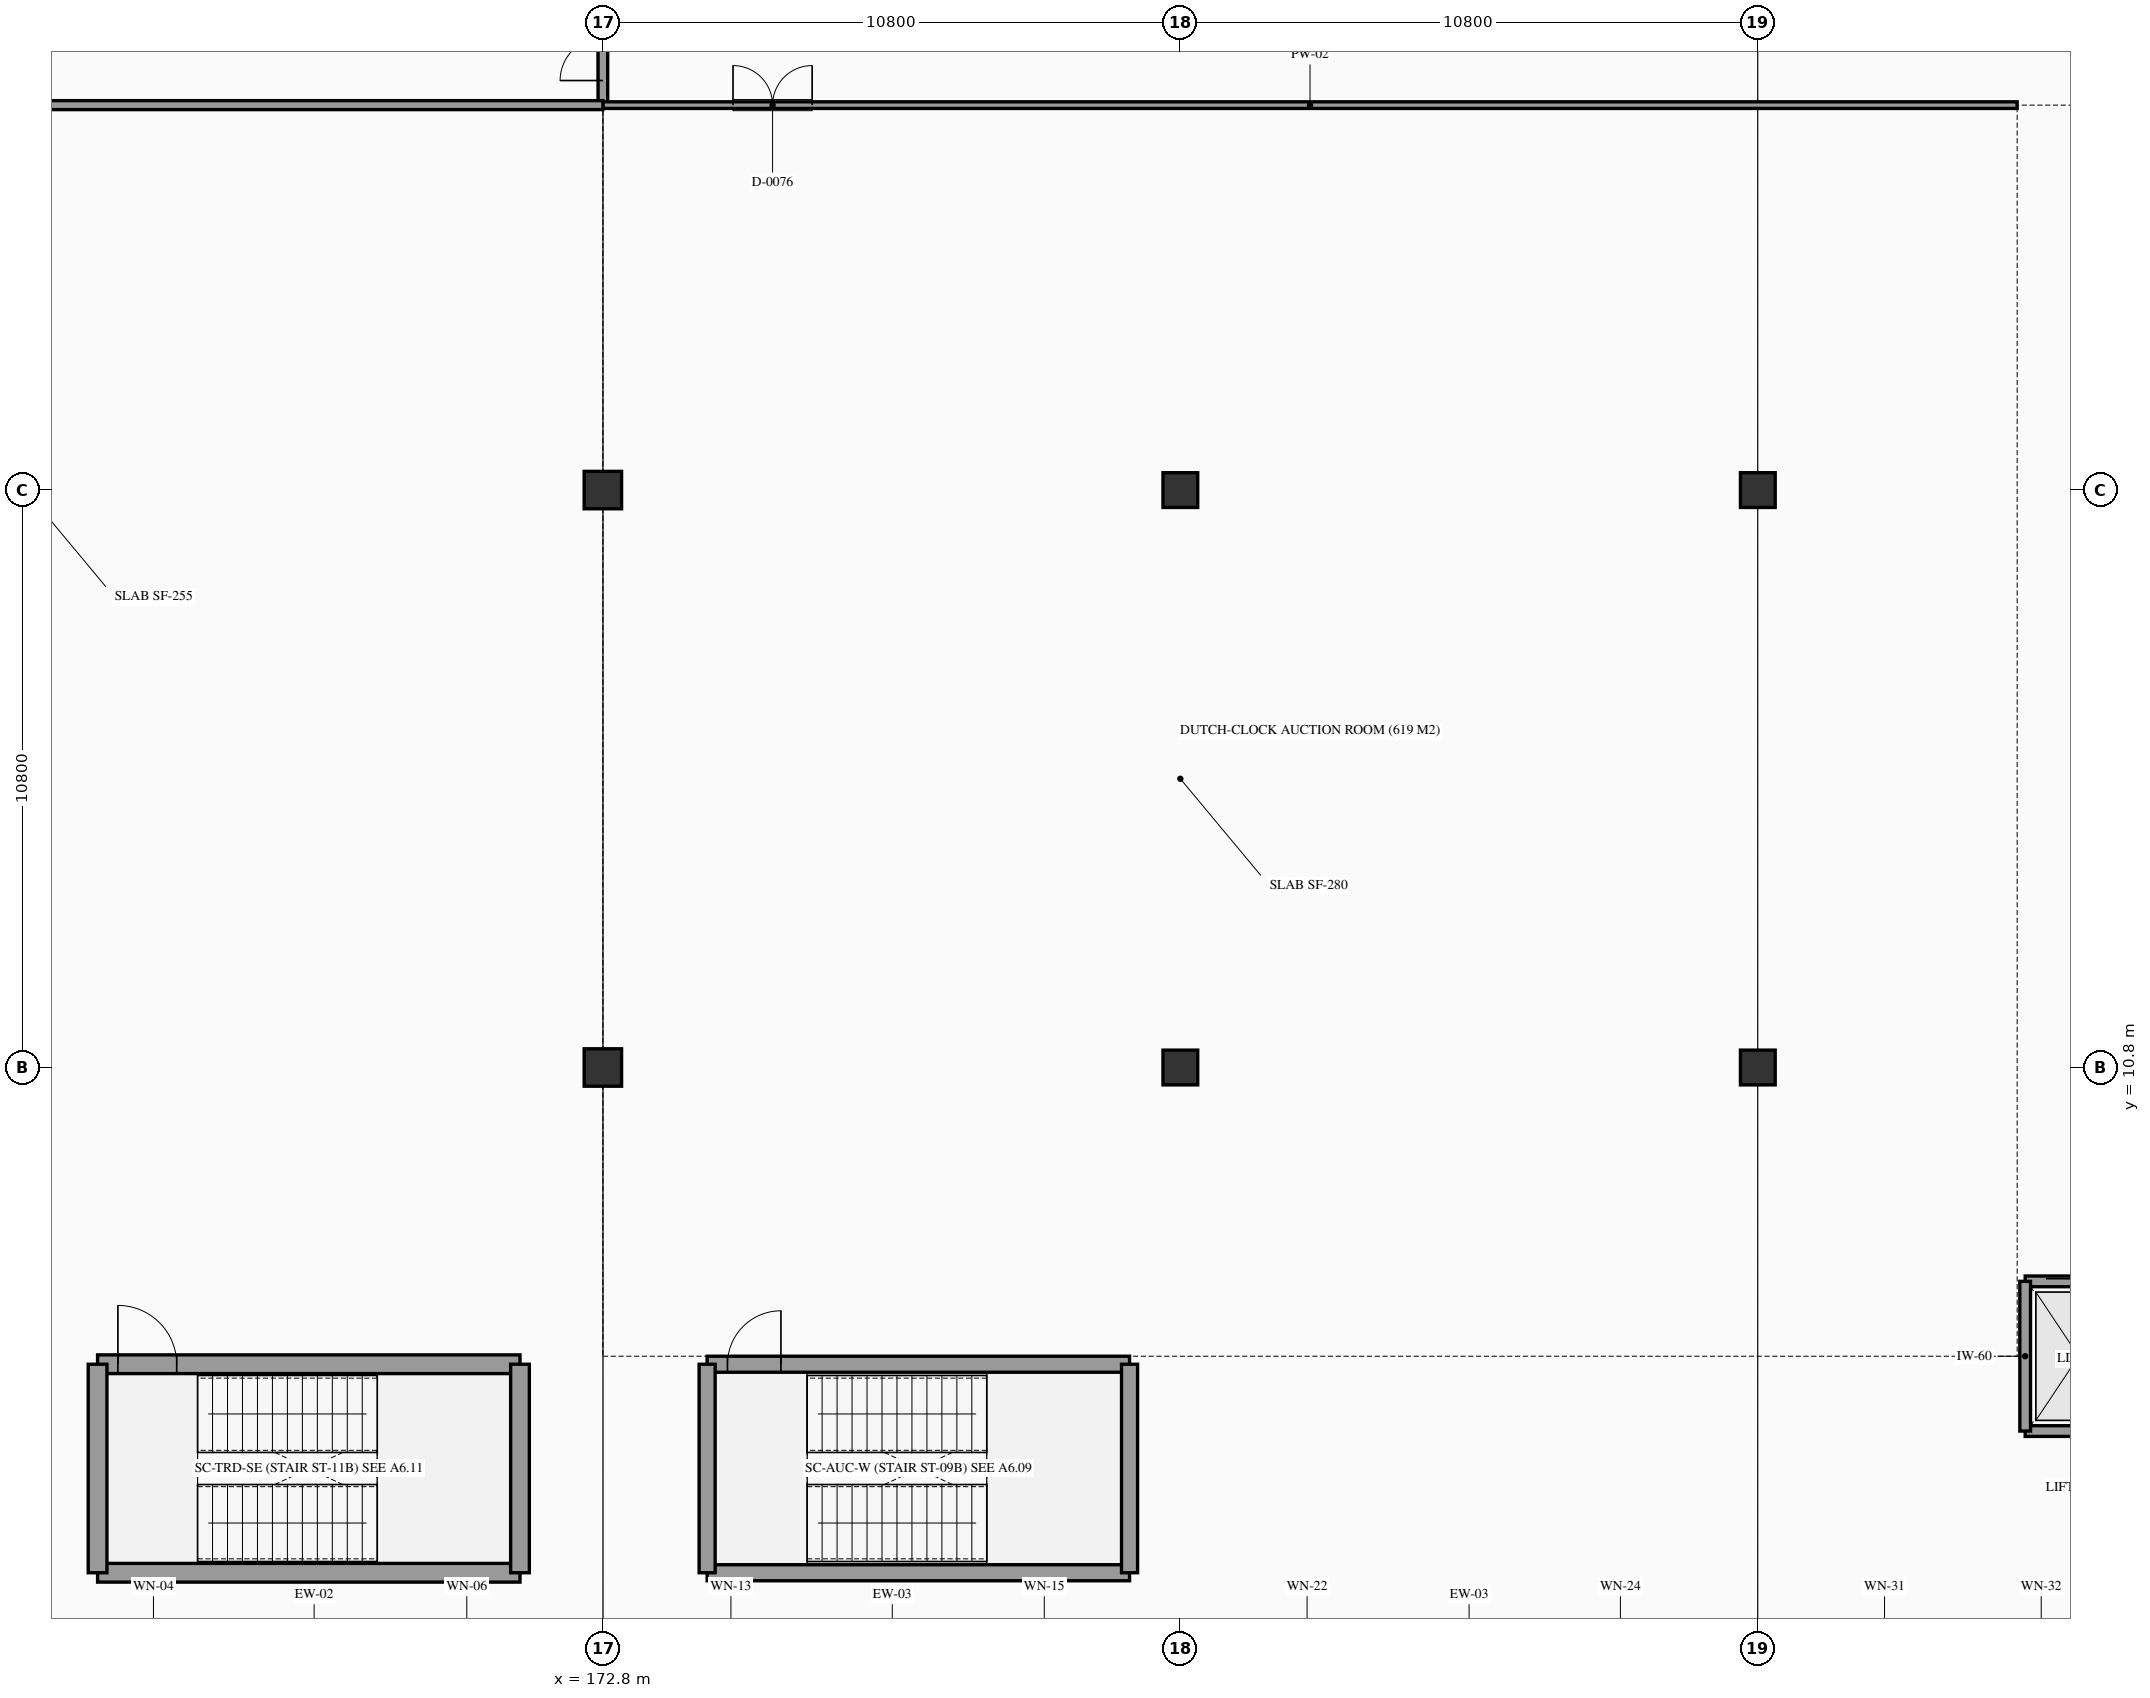
"""IFC4 building model, lengths in metres.
Left out: names, types, materials, properties, quantities, classifications, styles, units other than length and angle.
Written with IfcOpenShell. Run it as: python <this file> out.ifc"""

import sys

from ifc_helpers import new_model, si_unit, direction, frame, frame_2d, origin, origin_2d, place, context, subcontext, project, spatial, rectangle, extrude, element, fill, save


model = new_model("IFC4")
c1 = context("Model", 3, precision=1e-05, world=origin(), true_north=direction((0.0, 1.0)))
c2 = subcontext(c1, "Body", "Model", "MODEL_VIEW")
j1 = project(units=[si_unit("LENGTHUNIT", "METRE"), si_unit("PLANEANGLEUNIT", "RADIAN")], contexts=[c1])
p1 = place(None, origin())
s1 = spatial("IfcSite", under=j1, at=p1, CompositionType="ELEMENT")
p2 = place(p1, origin())
s2 = spatial("IfcBuilding", under=s1, at=p2, CompositionType="ELEMENT")
p3 = place(p2, frame((0.0, 0.0, 5.4)))
s3 = spatial("IfcBuildingStorey", under=s2, at=p3, CompositionType="ELEMENT", Elevation=5.4)
for number, where, z_axis, x_axis in (
    (1, (172.8, 10.8, 0.0), (0.0, 0.0, 1.0), (1.0, 0.0, 0.0)),
    (2, (172.8, 21.6, 0.0), (0.0, 0.0, 1.0), (1.0, 0.0, 0.0)),
):
    element("IfcColumn", number, at=place(p3, frame(where, z_axis=z_axis, x_axis=x_axis)), inside=s3, PredefinedType="COLUMN", context=c2, shape_type="SweptSolid", body=[
        extrude(rectangle(XDim=0.7, YDim=0.7, at=origin_2d()), origin(), (0.0, 0.0, 1.0), 4.68),
    ])
for number, where, z_axis, x_axis in (
    (3, (183.6, 10.8, 0.0), (0.0, 0.0, 1.0), (1.0, 0.0, 0.0)),
    (4, (183.6, 21.6, 0.0), (0.0, 0.0, 1.0), (1.0, 0.0, 0.0)),
    (5, (194.4, 10.8, 0.0), (0.0, 0.0, 1.0), (1.0, 0.0, 0.0)),
    (6, (194.4, 21.6, 0.0), (0.0, 0.0, 1.0), (1.0, 0.0, 0.0)),
):
    element("IfcColumn", number, at=place(p3, frame(where, z_axis=z_axis, x_axis=x_axis)), inside=s3, PredefinedType="COLUMN", context=c2, shape_type="SweptSolid", body=[
        extrude(rectangle(XDim=0.65, YDim=0.65, at=origin_2d()), origin(), (0.0, 0.0, 1.0), 4.68),
    ])
p4 = place(p3, frame((174.75, 1.35, 0.0), z_axis=(0.0, 0.0, 1.0), x_axis=(1.0, 0.0, 0.0)))
e7 = element("IfcWall", 7, at=p4, inside=s3, PredefinedType="SHEAR", context=c2, shape_type="SweptSolid", body=[
    extrude(rectangle(XDim=7.9, YDim=0.3, at=frame_2d((3.95, 0.0))), origin(), (0.0, 0.0, 1.0), 4.68),
])
p5 = place(p3, frame((174.75, 5.25, 0.0), z_axis=(0.0, 0.0, 1.0), x_axis=(1.0, 0.0, 0.0)))
e8 = element("IfcWall", 8, at=p5, inside=s3, PredefinedType="SHEAR", context=c2, shape_type="SweptSolid", body=[
    extrude(rectangle(XDim=7.9, YDim=0.3, at=frame_2d((3.95, 0.0))), origin(), (0.0, 0.0, 1.0), 4.68),
])
p6 = place(p5, frame((0.38, 0.0, 0.0)))
e9 = element("IfcOpeningElement", 9, at=p6, cuts=e8, PredefinedType="OPENING", context=c2, shape_type="SweptSolid", body=[
    extrude(rectangle(XDim=1.0, YDim=2.15, at=frame_2d((0.5, 1.075))), frame((0.0, 0.16, 0.0), z_axis=(0.0, -1.0, 0.0), x_axis=(1.0, 0.0, 0.0)), (0.0, 0.0, 1.0), 0.32),
])
for number, where, z_axis, x_axis in (
    (10, (174.75, 1.35, 0.0), (0.0, 0.0, 1.0), (0.0, 1.0, 0.0)),
    (11, (182.65, 1.35, 0.0), (0.0, 0.0, 1.0), (0.0, 1.0, 0.0)),
):
    element("IfcWall", number, at=place(p3, frame(where, z_axis=z_axis, x_axis=x_axis)), inside=s3, PredefinedType="SHEAR", context=c2, shape_type="SweptSolid", body=[
        extrude(rectangle(XDim=3.9, YDim=0.3, at=frame_2d((1.95, 0.0))), origin(), (0.0, 0.0, 1.0), 4.68),
    ])
p7 = place(p3, frame((163.35, 1.35, 0.0), z_axis=(0.0, 0.0, 1.0), x_axis=(1.0, 0.0, 0.0)))
e12 = element("IfcWall", 12, at=p7, inside=s3, PredefinedType="SHEAR", context=c2, shape_type="SweptSolid", body=[
    extrude(rectangle(XDim=7.9, YDim=0.35, at=frame_2d((3.95, 0.0))), origin(), (0.0, 0.0, 1.0), 4.68),
])
p8 = place(p3, frame((163.35, 5.25, 0.0), z_axis=(0.0, 0.0, 1.0), x_axis=(1.0, 0.0, 0.0)))
e13 = element("IfcWall", 13, at=p8, inside=s3, PredefinedType="SHEAR", context=c2, shape_type="SweptSolid", body=[
    extrude(rectangle(XDim=7.9, YDim=0.35, at=frame_2d((3.95, 0.0))), origin(), (0.0, 0.0, 1.0), 4.68),
])
p9 = place(p8, frame((0.38, 0.0, 0.0)))
e14 = element("IfcOpeningElement", 14, at=p9, cuts=e13, PredefinedType="OPENING", context=c2, shape_type="SweptSolid", body=[
    extrude(rectangle(XDim=1.1, YDim=2.2, at=frame_2d((0.55, 1.1))), frame((0.0, 0.185, 0.0), z_axis=(0.0, -1.0, 0.0), x_axis=(1.0, 0.0, 0.0)), (0.0, 0.0, 1.0), 0.37),
])
for number, where, z_axis, x_axis in (
    (15, (163.35, 1.35, 0.0), (0.0, 0.0, 1.0), (0.0, 1.0, 0.0)),
    (16, (171.25, 1.35, 0.0), (0.0, 0.0, 1.0), (0.0, 1.0, 0.0)),
):
    element("IfcWall", number, at=place(p3, frame(where, z_axis=z_axis, x_axis=x_axis)), inside=s3, PredefinedType="SHEAR", context=c2, shape_type="SweptSolid", body=[
        extrude(rectangle(XDim=3.9, YDim=0.35, at=frame_2d((1.95, 0.0))), origin(), (0.0, 0.0, 1.0), 4.68),
    ])
p10 = place(p3, frame((199.4, 4.0, 0.0), z_axis=(0.0, 0.0, 1.0), x_axis=(1.0, 0.0, 0.0)))
e17 = element("IfcWall", 17, at=p10, inside=s3, PredefinedType="SOLIDWALL", context=c2, shape_type="SweptSolid", body=[
    extrude(rectangle(XDim=2.0, YDim=0.2, at=frame_2d((1.0, 0.0))), origin(), (0.0, 0.0, 1.0), 3.5),
])
p11 = place(p3, frame((199.4, 6.8, 0.0), z_axis=(0.0, 0.0, 1.0), x_axis=(1.0, 0.0, 0.0)))
e18 = element("IfcWall", 18, at=p11, inside=s3, PredefinedType="SOLIDWALL", context=c2, shape_type="SweptSolid", body=[
    extrude(rectangle(XDim=2.0, YDim=0.2, at=frame_2d((1.0, 0.0))), origin(), (0.0, 0.0, 1.0), 3.5),
])
p12 = place(p11, frame((0.39, 0.0, 0.0)))
e19 = element("IfcOpeningElement", 19, at=p12, cuts=e18, PredefinedType="OPENING", context=c2, shape_type="SweptSolid", body=[
    extrude(rectangle(XDim=1.22, YDim=2.2, at=frame_2d((0.61, 1.1))), frame((0.0, 0.11, 0.0), z_axis=(0.0, -1.0, 0.0), x_axis=(1.0, 0.0, 0.0)), (0.0, 0.0, 1.0), 0.22),
])
p13 = place(p3, frame((199.4, 4.0, 0.0), z_axis=(0.0, 0.0, 1.0), x_axis=(0.0, 1.0, 0.0)))
e20 = element("IfcWall", 20, at=p13, inside=s3, PredefinedType="SOLIDWALL", context=c2, shape_type="SweptSolid", body=[
    extrude(rectangle(XDim=2.8, YDim=0.2, at=frame_2d((1.4, 0.0))), origin(), (0.0, 0.0, 1.0), 3.5),
])
p14 = place(p3, frame((172.8, 28.8, 0.0), z_axis=(0.0, 0.0, 1.0), x_axis=(0.0, 1.0, 0.0)))
e21 = element("IfcWall", 21, at=p14, inside=s3, PredefinedType="PARTITIONING", context=c2, shape_type="SweptSolid", body=[
    extrude(rectangle(XDim=3.6, YDim=0.18, at=frame_2d((1.8, 0.0))), origin(), (0.0, 0.0, 1.0), 3.23),
])
p15 = place(p14, frame((0.46, 0.0, 0.0)))
e22 = element("IfcOpeningElement", 22, at=p15, cuts=e21, PredefinedType="OPENING", context=c2, shape_type="SweptSolid", body=[
    extrude(rectangle(XDim=1.6, YDim=2.2, at=frame_2d((0.8, 1.1))), frame((0.0, 0.1, 0.0), z_axis=(0.0, -1.0, 0.0), x_axis=(1.0, 0.0, 0.0)), (0.0, 0.0, 1.0), 0.2),
])
p16 = place(p3, frame((172.8, 28.8, 0.0), z_axis=(0.0, 0.0, 1.0), x_axis=(1.0, 0.0, 0.0)))
e23 = element("IfcWall", 23, at=p16, inside=s3, PredefinedType="PARTITIONING", context=c2, shape_type="SweptSolid", body=[
    extrude(rectangle(XDim=26.45, YDim=0.124, at=frame_2d((13.225, 0.0))), origin(), (0.0, 0.0, 1.0), 3.23),
])
p17 = place(p16, frame((2.434, 0.0, 0.0)))
e24 = element("IfcOpeningElement", 24, at=p17, cuts=e23, PredefinedType="OPENING", context=c2, shape_type="SweptSolid", body=[
    extrude(rectangle(XDim=1.48, YDim=2.2, at=frame_2d((0.74, 1.1))), frame((0.0, 0.072, 0.0), z_axis=(0.0, -1.0, 0.0), x_axis=(1.0, 0.0, 0.0)), (0.0, 0.0, 1.0), 0.144),
])
p18 = place(p3, frame((155.45, 28.8, 0.0), z_axis=(0.0, 0.0, 1.0), x_axis=(1.0, 0.0, 0.0)))
e25 = element("IfcWall", 25, at=p18, inside=s3, PredefinedType="PARTITIONING", context=c2, shape_type="SweptSolid", body=[
    extrude(rectangle(XDim=17.35, YDim=0.168, at=frame_2d((8.675, 0.0))), origin(), (0.0, 0.0, 1.0), 3.23),
])
p19 = place(p6, origin())
e26 = element("IfcDoor", 26, at=p19, inside=s3, OperationType="SINGLE_SWING_RIGHT", PredefinedType="DOOR", context=c2, shape_type="SweptSolid", body=[
    extrude(rectangle(XDim=1.0, YDim=2.15, at=frame_2d((0.5, 1.075))), frame((0.0, 0.025, 0.0), z_axis=(0.0, -1.0, 0.0), x_axis=(1.0, 0.0, 0.0)), (0.0, 0.0, 1.0), 0.05),
])
fill(e9, e26)
p20 = place(p9, origin())
e27 = element("IfcDoor", 27, at=p20, inside=s3, OperationType="SINGLE_SWING_LEFT", PredefinedType="DOOR", context=c2, shape_type="SweptSolid", body=[
    extrude(rectangle(XDim=1.1, YDim=2.2, at=frame_2d((0.55, 1.1))), frame((0.0, 0.025, 0.0), z_axis=(0.0, -1.0, 0.0), x_axis=(1.0, 0.0, 0.0)), (0.0, 0.0, 1.0), 0.05),
])
fill(e14, e27)
p21 = place(p12, origin())
e28 = element("IfcDoor", 28, at=p21, inside=s3, OperationType="DOUBLE_DOOR_SLIDING", PredefinedType="DOOR", context=c2, shape_type="SweptSolid", body=[
    extrude(rectangle(XDim=1.22, YDim=2.2, at=frame_2d((0.61, 1.1))), frame((0.0, 0.025, 0.0), z_axis=(0.0, -1.0, 0.0), x_axis=(1.0, 0.0, 0.0)), (0.0, 0.0, 1.0), 0.05),
])
fill(e19, e28)
p22 = place(p15, origin())
e29 = element("IfcDoor", 29, at=p22, inside=s3, OperationType="DOUBLE_DOOR_SINGLE_SWING", PredefinedType="DOOR", context=c2, shape_type="SweptSolid", body=[
    extrude(rectangle(XDim=1.6, YDim=2.2, at=frame_2d((0.8, 1.1))), frame((0.0, 0.025, 0.0), z_axis=(0.0, -1.0, 0.0), x_axis=(1.0, 0.0, 0.0)), (0.0, 0.0, 1.0), 0.05),
])
fill(e22, e29)
p23 = place(p17, origin())
e30 = element("IfcDoor", 30, at=p23, inside=s3, OperationType="DOUBLE_DOOR_SINGLE_SWING", PredefinedType="DOOR", context=c2, shape_type="SweptSolid", body=[
    extrude(rectangle(XDim=1.48, YDim=2.2, at=frame_2d((0.74, 1.1))), frame((0.0, 0.025, 0.0), z_axis=(0.0, -1.0, 0.0), x_axis=(1.0, 0.0, 0.0)), (0.0, 0.0, 1.0), 0.05),
])
fill(e24, e30)
save(model, sys.argv[1])
